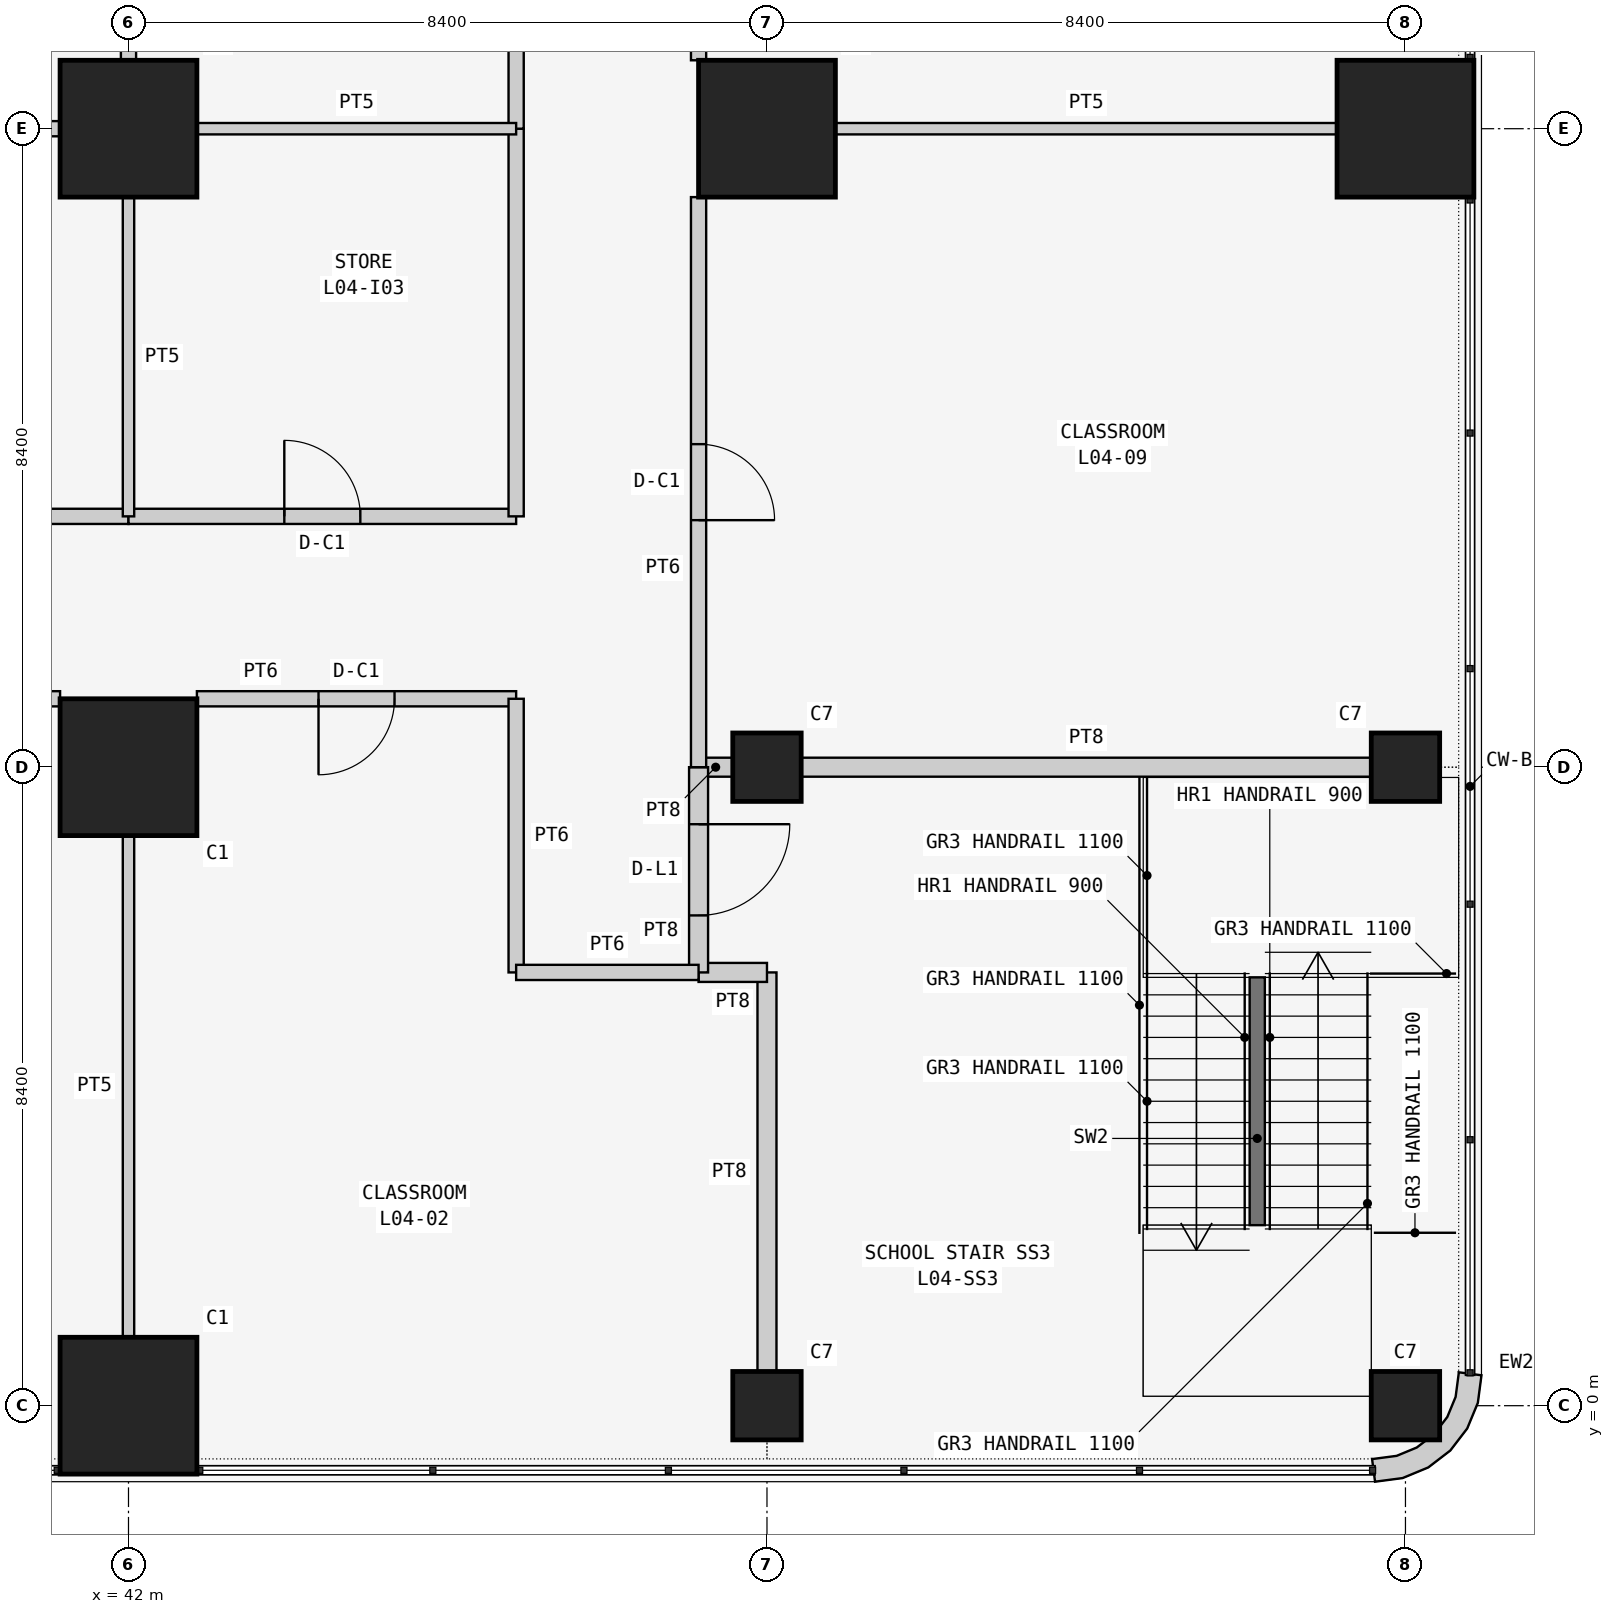
"""IFC4 building model, lengths in metres.
Left out: names, types, materials, properties, quantities, classifications, styles, units other than length and angle.
Written with IfcOpenShell. Run it as: python <this file> out.ifc"""

import sys

from ifc_helpers import new_model, si_unit, direction, frame, frame_2d, origin, origin_2d, place, context, subcontext, project, spatial, polyline, rectangle, outline, extrude, element, fill, save


model = new_model("IFC4")
c1 = context("Model", 3, precision=1e-05, world=origin(), true_north=direction((0.0, 1.0)))
c2 = subcontext(c1, "Body", "Model", "MODEL_VIEW")
j1 = project(units=[si_unit("LENGTHUNIT", "METRE"), si_unit("PLANEANGLEUNIT", "RADIAN")], contexts=[c1])
p1 = place(None, origin())
s1 = spatial("IfcSite", under=j1, at=p1, CompositionType="ELEMENT")
p2 = place(p1, origin())
s2 = spatial("IfcBuilding", under=s1, at=p2, CompositionType="ELEMENT")
p3 = place(p2, frame((0.0, 0.0, 19.5)))
s3 = spatial("IfcBuildingStorey", under=s2, at=p3, CompositionType="ELEMENT", Elevation=19.5)
for number, where, z_axis, x_axis in (
    (1, (42.0, 0.0, 0.0), (0.0, 0.0, 1.0), (1.0, 0.0, 0.0)),
    (2, (42.0, 8.4, 0.0), (0.0, 0.0, 1.0), (1.0, 0.0, 0.0)),
    (3, (42.0, 16.8, 0.0), (0.0, 0.0, 1.0), (1.0, 0.0, 0.0)),
):
    element("IfcColumn", number, at=place(p3, frame(where, z_axis=z_axis, x_axis=x_axis)), inside=s3, PredefinedType="COLUMN", context=c2, shape_type="SweptSolid", body=[
        extrude(rectangle(XDim=1.8, YDim=1.8, at=origin_2d()), origin(), (0.0, 0.0, 1.0), 4.5),
    ])
for number, where, z_axis, x_axis in (
    (4, (50.4, 0.0, 0.0), (0.0, 0.0, 1.0), (1.0, 0.0, 0.0)),
    (5, (50.4, 8.4, 0.0), (0.0, 0.0, 1.0), (1.0, 0.0, 0.0)),
):
    element("IfcColumn", number, at=place(p3, frame(where, z_axis=z_axis, x_axis=x_axis)), inside=s3, PredefinedType="COLUMN", context=c2, shape_type="SweptSolid", body=[
        extrude(rectangle(XDim=0.9, YDim=0.9, at=origin_2d()), origin(), (0.0, 0.0, 1.0), 4.5),
    ])
p4 = place(p3, frame((50.4, 16.8, 0.0), z_axis=(0.0, 0.0, 1.0), x_axis=(1.0, 0.0, 0.0)))
e6 = element("IfcColumn", 6, at=p4, inside=s3, PredefinedType="COLUMN", context=c2, shape_type="SweptSolid", body=[
    extrude(rectangle(XDim=1.8, YDim=1.8, at=origin_2d()), origin(), (0.0, 0.0, 1.0), 4.5),
])
for number, where, z_axis, x_axis in (
    (7, (58.8, 0.0, 0.0), (0.0, 0.0, 1.0), (1.0, 0.0, 0.0)),
    (8, (58.8, 8.4, 0.0), (0.0, 0.0, 1.0), (1.0, 0.0, 0.0)),
):
    element("IfcColumn", number, at=place(p3, frame(where, z_axis=z_axis, x_axis=x_axis)), inside=s3, PredefinedType="COLUMN", context=c2, shape_type="SweptSolid", body=[
        extrude(rectangle(XDim=0.9, YDim=0.9, at=origin_2d()), origin(), (0.0, 0.0, 1.0), 4.5),
    ])
p5 = place(p3, frame((58.8, 16.8, 0.0), z_axis=(0.0, 0.0, 1.0), x_axis=(1.0, 0.0, 0.0)))
e9 = element("IfcColumn", 9, at=p5, inside=s3, PredefinedType="COLUMN", context=c2, shape_type="SweptSolid", body=[
    extrude(rectangle(XDim=1.8, YDim=1.8, at=origin_2d()), origin(), (0.0, 0.0, 1.0), 4.5),
])
p6 = place(p3, frame((58.355, -0.848, 0.0), z_axis=(0.0, 0.0, 1.0), x_axis=(0.707106781187, -0.707106781187, 0.0)))
e10 = element("IfcWall", 10, at=p6, inside=s3, PredefinedType="SOLIDWALL", context=c2, shape_type="SweptSolid", body=[
    extrude(outline(polyline([(0.139, 1.904), (-0.101, 1.72), (-0.087, 1.706), (0.1, 1.463), (0.209, 1.198), (0.247, 0.914), (0.209, 0.63), (0.1, 0.365), (-0.087, 0.122), (-0.101, 0.108), (0.139, -0.076), (0.362, 0.214), (0.502, 0.552), (0.549, 0.914), (0.502, 1.276), (0.362, 1.614), (0.139, 1.904)])), origin(), (0.0, 0.0, 1.0), 4.3),
])
p7 = place(p3, frame((50.4, 0.45, 0.0), z_axis=(0.0, 0.0, 1.0), x_axis=(0.0, 1.0, 0.0)))
e11 = element("IfcWall", 11, at=p7, inside=s3, PredefinedType="SOLIDWALL", context=c2, shape_type="SweptSolid", body=[
    extrude(rectangle(XDim=5.25, YDim=0.25, at=frame_2d((2.625, 0.0))), origin(), (0.0, 0.0, 1.0), 3.543),
])
p8 = place(p3, frame((50.4, 5.7, 0.0), z_axis=(0.0, 0.0, 1.0), x_axis=(-1.0, 0.0, 0.0)))
e12 = element("IfcWall", 12, at=p8, inside=s3, PredefinedType="SOLIDWALL", context=c2, shape_type="SweptSolid", body=[
    extrude(rectangle(XDim=0.9, YDim=0.25, at=frame_2d((0.45, 0.0))), origin(), (0.0, 0.0, 1.0), 4.3),
])
p9 = place(p3, frame((49.5, 8.4, 0.0), z_axis=(0.0, 0.0, 1.0), x_axis=(1.0, 0.0, 0.0)))
e13 = element("IfcWall", 13, at=p9, inside=s3, PredefinedType="SOLIDWALL", context=c2, shape_type="SweptSolid", body=[
    extrude(rectangle(XDim=0.45, YDim=0.25, at=frame_2d((0.225, 0.0))), origin(), (0.0, 0.0, 1.0), 3.543),
])
p10 = place(p3, frame((50.85, 8.4, 0.0), z_axis=(0.0, 0.0, 1.0), x_axis=(1.0, 0.0, 0.0)))
e14 = element("IfcWall", 14, at=p10, inside=s3, PredefinedType="SOLIDWALL", context=c2, shape_type="SweptSolid", body=[
    extrude(rectangle(XDim=7.5, YDim=0.25, at=frame_2d((3.75, 0.0))), origin(), (0.0, 0.0, 1.0), 3.543),
])
p11 = place(p3, frame((49.5, 5.7, 0.0), z_axis=(0.0, 0.0, 1.0), x_axis=(0.0, 1.0, 0.0)))
e15 = element("IfcWall", 15, at=p11, inside=s3, PredefinedType="SOLIDWALL", context=c2, shape_type="SweptSolid", body=[
    extrude(rectangle(XDim=2.7, YDim=0.25, at=frame_2d((1.35, 0.0))), origin(), (0.0, 0.0, 1.0), 4.3),
])
p12 = place(p11, frame((0.75, 0.0, 0.0)))
e16 = element("IfcOpeningElement", 16, at=p12, cuts=e15, PredefinedType="OPENING", context=c2, shape_type="SweptSolid", body=[
    extrude(rectangle(XDim=1.2, YDim=2.1, at=frame_2d((0.6, 1.05))), frame((0.0, 0.135, 0.0), z_axis=(0.0, -1.0, 0.0), x_axis=(1.0, 0.0, 0.0)), (0.0, 0.0, 1.0), 0.27),
])
p13 = place(p3, frame((42.0, 0.9, 0.0), z_axis=(0.0, 0.0, 1.0), x_axis=(0.0, 1.0, 0.0)))
e17 = element("IfcWall", 17, at=p13, inside=s3, PredefinedType="PARTITIONING", context=c2, shape_type="SweptSolid", body=[
    extrude(rectangle(XDim=6.6, YDim=0.15, at=frame_2d((3.3, 0.0))), origin(), (0.0, 0.0, 1.0), 3.543),
])
p14 = place(p3, frame((42.9, 9.3, 0.0), z_axis=(0.0, 0.0, 1.0), x_axis=(1.0, 0.0, 0.0)))
e18 = element("IfcWall", 18, at=p14, inside=s3, PredefinedType="PARTITIONING", context=c2, shape_type="SweptSolid", body=[
    extrude(rectangle(XDim=4.2, YDim=0.2, at=frame_2d((2.1, 0.0))), origin(), (0.0, 0.0, 1.0), 4.3),
])
p15 = place(p14, frame((1.6, 0.0, 0.0)))
e19 = element("IfcOpeningElement", 19, at=p15, cuts=e18, PredefinedType="OPENING", context=c2, shape_type="SweptSolid", body=[
    extrude(rectangle(XDim=1.0, YDim=2.1, at=frame_2d((0.5, 1.05))), frame((0.0, 0.11, 0.0), z_axis=(0.0, -1.0, 0.0), x_axis=(1.0, 0.0, 0.0)), (0.0, 0.0, 1.0), 0.22),
])
p16 = place(p3, frame((47.1, 9.3, 0.0), z_axis=(0.0, 0.0, 1.0), x_axis=(0.0, -1.0, 0.0)))
e20 = element("IfcWall", 20, at=p16, inside=s3, PredefinedType="PARTITIONING", context=c2, shape_type="SweptSolid", body=[
    extrude(rectangle(XDim=3.6, YDim=0.2, at=frame_2d((1.8, 0.0))), origin(), (0.0, 0.0, 1.0), 4.3),
])
p17 = place(p3, frame((47.1, 5.7, 0.0), z_axis=(0.0, 0.0, 1.0), x_axis=(1.0, 0.0, 0.0)))
e21 = element("IfcWall", 21, at=p17, inside=s3, PredefinedType="PARTITIONING", context=c2, shape_type="SweptSolid", body=[
    extrude(rectangle(XDim=2.4, YDim=0.2, at=frame_2d((1.2, 0.0))), origin(), (0.0, 0.0, 1.0), 4.3),
])
p18 = place(p3, frame((34.5, 9.3, 0.0), z_axis=(0.0, 0.0, 1.0), x_axis=(1.0, 0.0, 0.0)))
e22 = element("IfcWall", 22, at=p18, inside=s3, PredefinedType="PARTITIONING", context=c2, shape_type="SweptSolid", body=[
    extrude(rectangle(XDim=6.6, YDim=0.2, at=frame_2d((3.3, 0.0))), origin(), (0.0, 0.0, 1.0), 4.3),
])
p19 = place(p18, frame((2.8, 0.0, 0.0)))
e23 = element("IfcOpeningElement", 23, at=p19, cuts=e22, PredefinedType="OPENING", context=c2, shape_type="SweptSolid", body=[
    extrude(rectangle(XDim=1.0, YDim=2.1, at=frame_2d((0.5, 1.05))), frame((0.0, 0.11, 0.0), z_axis=(0.0, -1.0, 0.0), x_axis=(1.0, 0.0, 0.0)), (0.0, 0.0, 1.0), 0.22),
])
p20 = place(p3, frame((51.3, 16.8, 0.0), z_axis=(0.0, 0.0, 1.0), x_axis=(1.0, 0.0, 0.0)))
e24 = element("IfcWall", 24, at=p20, inside=s3, PredefinedType="PARTITIONING", context=c2, shape_type="SweptSolid", body=[
    extrude(rectangle(XDim=6.6, YDim=0.15, at=frame_2d((3.3, 0.0))), origin(), (0.0, 0.0, 1.0), 3.543),
])
p21 = place(p3, frame((49.5, 8.4, 0.0), z_axis=(0.0, 0.0, 1.0), x_axis=(0.0, 1.0, 0.0)))
e25 = element("IfcWall", 25, at=p21, inside=s3, PredefinedType="PARTITIONING", context=c2, shape_type="SweptSolid", body=[
    extrude(rectangle(XDim=7.5, YDim=0.2, at=frame_2d((3.75, 0.0))), origin(), (0.0, 0.0, 1.0), 4.3),
])
p22 = place(p21, frame((3.25, 0.0, 0.0)))
e26 = element("IfcOpeningElement", 26, at=p22, cuts=e25, PredefinedType="OPENING", context=c2, shape_type="SweptSolid", body=[
    extrude(rectangle(XDim=1.0, YDim=2.1, at=frame_2d((0.5, 1.05))), frame((0.0, 0.11, 0.0), z_axis=(0.0, -1.0, 0.0), x_axis=(1.0, 0.0, 0.0)), (0.0, 0.0, 1.0), 0.22),
])
p23 = place(p3, frame((49.5, 17.7, 0.0), z_axis=(0.0, 0.0, 1.0), x_axis=(0.0, 1.0, 0.0)))
e27 = element("IfcWall", 27, at=p23, inside=s3, PredefinedType="PARTITIONING", context=c2, shape_type="SweptSolid", body=[
    extrude(rectangle(XDim=6.6, YDim=0.2, at=frame_2d((3.3, 0.0))), origin(), (0.0, 0.0, 1.0), 4.3),
])
p24 = place(p23, frame((2.8, 0.0, 0.0)))
e28 = element("IfcOpeningElement", 28, at=p24, cuts=e27, PredefinedType="OPENING", context=c2, shape_type="SweptSolid", body=[
    extrude(rectangle(XDim=1.0, YDim=2.1, at=frame_2d((0.5, 1.05))), frame((0.0, 0.11, 0.0), z_axis=(0.0, -1.0, 0.0), x_axis=(1.0, 0.0, 0.0)), (0.0, 0.0, 1.0), 0.22),
])
p25 = place(p3, frame((25.2, 11.7, 0.0), z_axis=(0.0, 0.0, 1.0), x_axis=(1.0, 0.0, 0.0)))
e29 = element("IfcWall", 29, at=p25, inside=s3, PredefinedType="PARTITIONING", context=c2, shape_type="SweptSolid", body=[
    extrude(rectangle(XDim=16.8, YDim=0.2, at=frame_2d((8.4, 0.0))), origin(), (0.0, 0.0, 1.0), 4.3),
])
p26 = place(p25, frame((7.9, 0.0, 0.0)))
e30 = element("IfcOpeningElement", 30, at=p26, cuts=e29, PredefinedType="OPENING", context=c2, shape_type="SweptSolid", body=[
    extrude(rectangle(XDim=1.0, YDim=2.1, at=frame_2d((0.5, 1.05))), frame((0.0, 0.11, 0.0), z_axis=(0.0, -1.0, 0.0), x_axis=(1.0, 0.0, 0.0)), (0.0, 0.0, 1.0), 0.22),
])
p27 = place(p3, frame((42.0, 11.7, 0.0), z_axis=(0.0, 0.0, 1.0), x_axis=(1.0, 0.0, 0.0)))
e31 = element("IfcWall", 31, at=p27, inside=s3, PredefinedType="PARTITIONING", context=c2, shape_type="SweptSolid", body=[
    extrude(rectangle(XDim=5.1, YDim=0.2, at=frame_2d((2.55, 0.0))), origin(), (0.0, 0.0, 1.0), 4.3),
])
p28 = place(p27, frame((2.05, 0.0, 0.0)))
e32 = element("IfcOpeningElement", 32, at=p28, cuts=e31, PredefinedType="OPENING", context=c2, shape_type="SweptSolid", body=[
    extrude(rectangle(XDim=1.0, YDim=2.1, at=frame_2d((0.5, 1.05))), frame((0.0, 0.11, 0.0), z_axis=(0.0, -1.0, 0.0), x_axis=(1.0, 0.0, 0.0)), (0.0, 0.0, 1.0), 0.22),
])
p29 = place(p3, frame((47.1, 11.7, 0.0), z_axis=(0.0, 0.0, 1.0), x_axis=(0.0, 1.0, 0.0)))
e33 = element("IfcWall", 33, at=p29, inside=s3, PredefinedType="PARTITIONING", context=c2, shape_type="SweptSolid", body=[
    extrude(rectangle(XDim=5.1, YDim=0.2, at=frame_2d((2.55, 0.0))), origin(), (0.0, 0.0, 1.0), 4.3),
])
p30 = place(p3, frame((47.1, 16.8, 0.0), z_axis=(0.0, 0.0, 1.0), x_axis=(0.0, 1.0, 0.0)))
e34 = element("IfcWall", 34, at=p30, inside=s3, PredefinedType="PARTITIONING", context=c2, shape_type="SweptSolid", body=[
    extrude(rectangle(XDim=8.4, YDim=0.2, at=frame_2d((4.2, 0.0))), origin(), (0.0, 0.0, 1.0), 4.3),
])
p31 = place(p30, frame((3.7, 0.0, 0.0)))
e35 = element("IfcOpeningElement", 35, at=p31, cuts=e34, PredefinedType="OPENING", context=c2, shape_type="SweptSolid", body=[
    extrude(rectangle(XDim=1.0, YDim=2.1, at=frame_2d((0.5, 1.05))), frame((0.0, 0.11, 0.0), z_axis=(0.0, -1.0, 0.0), x_axis=(1.0, 0.0, 0.0)), (0.0, 0.0, 1.0), 0.22),
])
p32 = place(p3, frame((41.1, 16.8, 0.0), z_axis=(0.0, 0.0, 1.0), x_axis=(-1.0, 0.0, 0.0)))
e36 = element("IfcWall", 36, at=p32, inside=s3, PredefinedType="PARTITIONING", context=c2, shape_type="SweptSolid", body=[
    extrude(rectangle(XDim=2.8, YDim=0.2, at=frame_2d((1.4, 0.0))), origin(), (0.0, 0.0, 1.0), 3.543),
])
p33 = place(p3, frame((42.0, 24.3, 0.0), z_axis=(0.0, 0.0, 1.0), x_axis=(0.0, -1.0, 0.0)))
e37 = element("IfcWall", 37, at=p33, inside=s3, PredefinedType="PARTITIONING", context=c2, shape_type="SweptSolid", body=[
    extrude(rectangle(XDim=6.6, YDim=0.2, at=frame_2d((3.3, 0.0))), origin(), (0.0, 0.0, 1.0), 3.543),
])
p34 = place(p3, frame((42.0, 15.9, 0.0), z_axis=(0.0, 0.0, 1.0), x_axis=(0.0, -1.0, 0.0)))
e38 = element("IfcWall", 38, at=p34, inside=s3, PredefinedType="PARTITIONING", context=c2, shape_type="SweptSolid", body=[
    extrude(rectangle(XDim=4.2, YDim=0.15, at=frame_2d((2.1, 0.0))), origin(), (0.0, 0.0, 1.0), 3.543),
])
p35 = place(p3, frame((42.9, 16.8, 0.0), z_axis=(0.0, 0.0, 1.0), x_axis=(1.0, 0.0, 0.0)))
e39 = element("IfcWall", 39, at=p35, inside=s3, PredefinedType="PARTITIONING", context=c2, shape_type="SweptSolid", body=[
    extrude(rectangle(XDim=4.2, YDim=0.15, at=frame_2d((2.1, 0.0))), origin(), (0.0, 0.0, 1.0), 3.543),
])
p36 = place(p3, frame((56.85, 2.375, 0.0), z_axis=(0.0, 0.0, 1.0), x_axis=(0.0, 1.0, 0.0)))
e40 = element("IfcWall", 40, at=p36, inside=s3, PredefinedType="SOLIDWALL", context=c2, shape_type="SweptSolid", body=[
    extrude(rectangle(XDim=3.26, YDim=0.2, at=frame_2d((1.63, 0.0))), origin(), (0.0, 0.0, 1.0), 4.5),
])
p37 = place(p12, frame((1.2, 0.0, 0.0), z_axis=(0.0, 0.0, 1.0), x_axis=(-1.0, 0.0, 0.0)))
e41 = element("IfcDoor", 41, at=p37, inside=s3, OperationType="SINGLE_SWING_LEFT", PredefinedType="DOOR", context=c2, shape_type="SweptSolid", body=[
    extrude(rectangle(XDim=1.2, YDim=2.1, at=frame_2d((0.6, 1.05))), frame((0.0, 0.025, 0.0), z_axis=(0.0, -1.0, 0.0), x_axis=(1.0, 0.0, 0.0)), (0.0, 0.0, 1.0), 0.05),
])
fill(e16, e41)
p38 = place(p15, frame((1.0, 0.0, 0.0), z_axis=(0.0, 0.0, 1.0), x_axis=(-1.0, 0.0, 0.0)))
e42 = element("IfcDoor", 42, at=p38, inside=s3, OperationType="SINGLE_SWING_RIGHT", PredefinedType="DOOR", context=c2, shape_type="SweptSolid", body=[
    extrude(rectangle(XDim=1.0, YDim=2.1, at=frame_2d((0.5, 1.05))), frame((0.0, 0.025, 0.0), z_axis=(0.0, -1.0, 0.0), x_axis=(1.0, 0.0, 0.0)), (0.0, 0.0, 1.0), 0.05),
])
fill(e19, e42)
p39 = place(p22, frame((1.0, 0.0, 0.0), z_axis=(0.0, 0.0, 1.0), x_axis=(-1.0, 0.0, 0.0)))
e43 = element("IfcDoor", 43, at=p39, inside=s3, OperationType="SINGLE_SWING_RIGHT", PredefinedType="DOOR", context=c2, shape_type="SweptSolid", body=[
    extrude(rectangle(XDim=1.0, YDim=2.1, at=frame_2d((0.5, 1.05))), frame((0.0, 0.025, 0.0), z_axis=(0.0, -1.0, 0.0), x_axis=(1.0, 0.0, 0.0)), (0.0, 0.0, 1.0), 0.05),
])
fill(e26, e43)
p40 = place(p28, origin())
e44 = element("IfcDoor", 44, at=p40, inside=s3, OperationType="SINGLE_SWING_LEFT", PredefinedType="DOOR", context=c2, shape_type="SweptSolid", body=[
    extrude(rectangle(XDim=1.0, YDim=2.1, at=frame_2d((0.5, 1.05))), frame((0.0, 0.025, 0.0), z_axis=(0.0, -1.0, 0.0), x_axis=(1.0, 0.0, 0.0)), (0.0, 0.0, 1.0), 0.05),
])
fill(e32, e44)
save(model, sys.argv[1])
